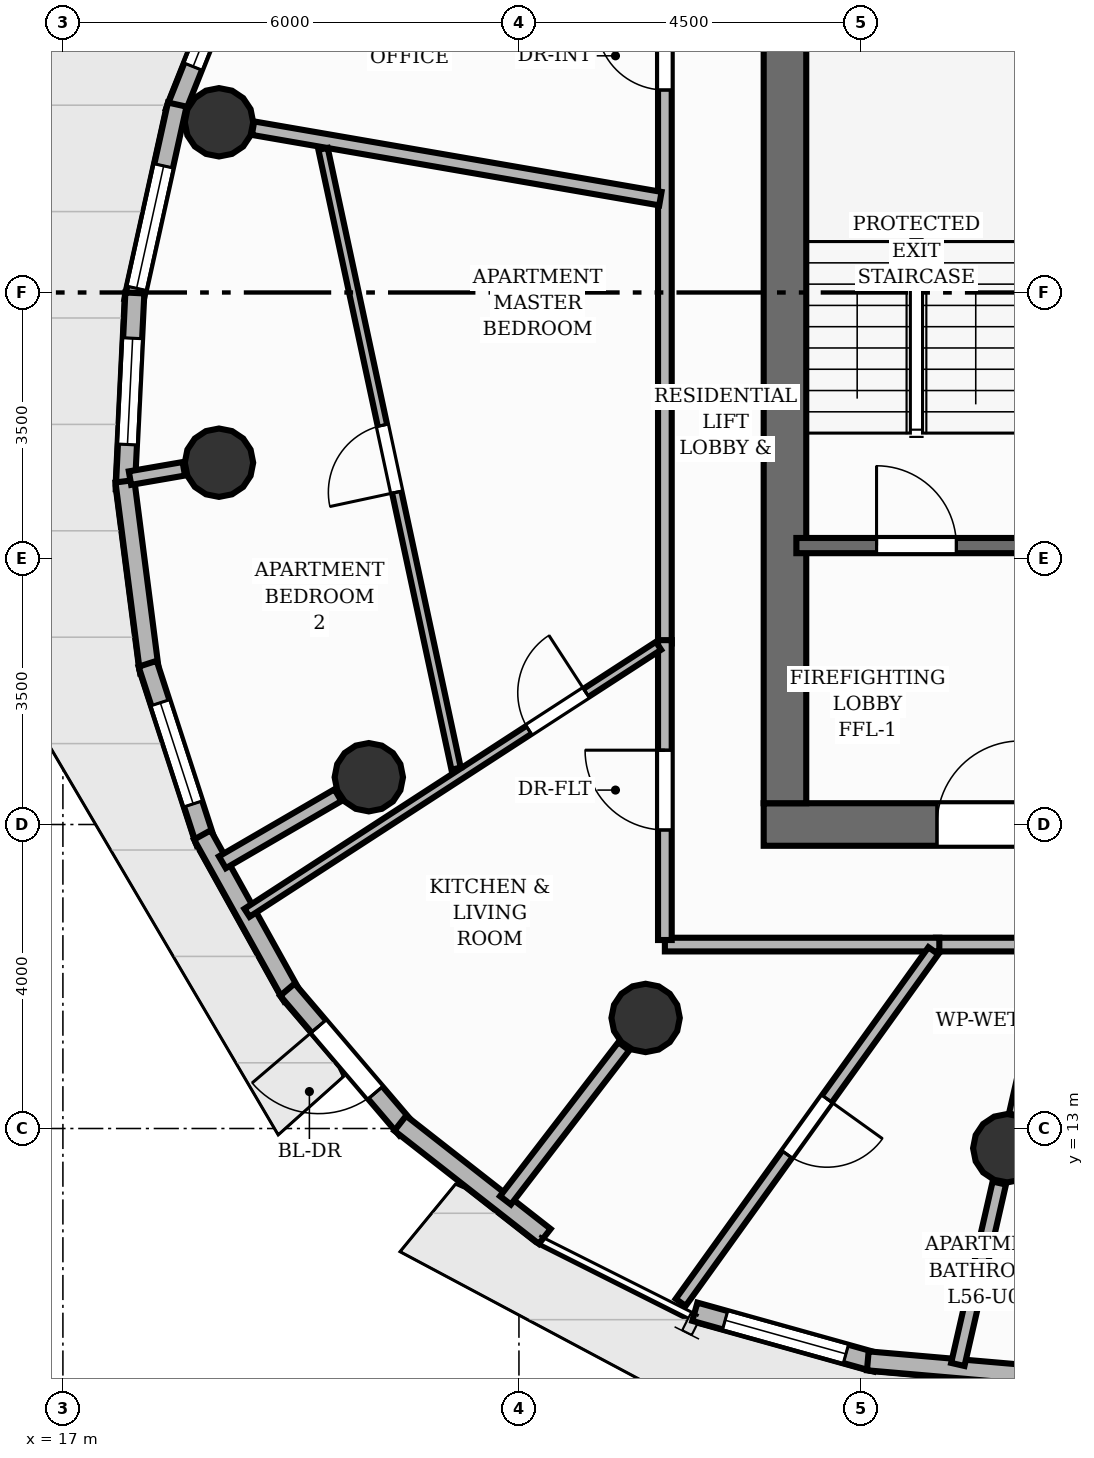
"""IFC4 building model, lengths in metres.
Left out: names, types, materials, properties, quantities, classifications, styles, units other than length and angle.
Written with IfcOpenShell. Run it as: python <this file> out.ifc"""

import sys

from ifc_helpers import new_model, si_unit, direction, frame, frame_2d, origin, origin_2d, place, context, subcontext, project, spatial, rectangle, circle, extrude, element, fill, save


model = new_model("IFC4")
c1 = context("Model", 3, precision=1e-05, world=origin(), true_north=direction((0.0, 1.0)))
c2 = subcontext(c1, "Body", "Model", "MODEL_VIEW")
j1 = project(units=[si_unit("LENGTHUNIT", "METRE"), si_unit("PLANEANGLEUNIT", "RADIAN")], contexts=[c1])
p1 = place(None, origin())
s1 = spatial("IfcSite", under=j1, at=p1, CompositionType="ELEMENT")
p2 = place(p1, origin())
s2 = spatial("IfcBuilding", under=s1, at=p2, CompositionType="ELEMENT")
p3 = place(p2, frame((0.0, 0.0, 188.64)))
s3 = spatial("IfcBuildingStorey", under=s2, at=p3, CompositionType="ELEMENT", Elevation=188.64)
p4 = place(p3, frame((26.22, 17.0, 0.0), z_axis=(0.0, 0.0, 1.0), x_axis=(1.0, 0.0, 0.0)))
e1 = element("IfcWall", 1, at=p4, inside=s3, PredefinedType="SHEAR", context=c2, shape_type="SweptSolid", body=[
    extrude(rectangle(XDim=11.56, YDim=0.56, at=frame_2d((5.78, 0.0))), origin(), (0.0, 0.0, 1.0), 3.2),
])
p5 = place(p4, frame((2.28, 0.0, 0.0)))
e2 = element("IfcOpeningElement", 2, at=p5, cuts=e1, PredefinedType="OPENING", context=c2, shape_type="SweptSolid", body=[
    extrude(rectangle(XDim=1.1, YDim=2.15, at=frame_2d((0.55, 1.075))), frame((0.0, 0.29, 0.0), z_axis=(0.0, -1.0, 0.0), x_axis=(1.0, 0.0, 0.0)), (0.0, 0.0, 1.0), 0.58),
])
p6 = place(p4, frame((5.83, 0.0, 0.0)))
e3 = element("IfcOpeningElement", 3, at=p6, cuts=e1, PredefinedType="OPENING", context=c2, shape_type="SweptSolid", body=[
    extrude(rectangle(XDim=0.9, YDim=2.1, at=frame_2d((0.45, 1.05))), frame((0.0, 0.29, 0.0), z_axis=(0.0, -1.0, 0.0), x_axis=(1.0, 0.0, 0.0)), (0.0, 0.0, 1.0), 0.58),
])
p7 = place(p3, frame((26.5, 17.28, 0.0), z_axis=(0.0, 0.0, 1.0), x_axis=(0.0, 1.0, 0.0)))
e4 = element("IfcWall", 4, at=p7, inside=s3, PredefinedType="SHEAR", context=c2, shape_type="SweptSolid", body=[
    extrude(rectangle(XDim=13.44, YDim=0.56, at=frame_2d((6.72, 0.0))), origin(), (0.0, 0.0, 1.0), 3.2),
])
for number, where, z_axis, x_axis in (
    (5, (19.054, 26.24, 0.0), (0.0, 0.0, 1.0), (1.0, 0.0, 0.0)),
    (6, (19.054, 21.76, 0.0), (0.0, 0.0, 1.0), (1.0, 0.0, 0.0)),
    (7, (21.025, 17.622, 0.0), (0.0, 0.0, 1.0), (1.0, 0.0, 0.0)),
    (8, (24.667, 14.455, 0.0), (0.0, 0.0, 1.0), (1.0, 0.0, 0.0)),
    (9, (29.425, 12.74, 0.0), (0.0, 0.0, 1.0), (1.0, 0.0, 0.0)),
):
    element("IfcColumn", number, at=place(p3, frame(where, z_axis=z_axis, x_axis=x_axis)), inside=s3, PredefinedType="COLUMN", context=c2, shape_type="SweptSolid", body=[
        extrude(circle(Radius=0.45, at=origin_2d()), origin(), (0.0, 0.0, 1.0), 3.2),
    ])
p8 = place(p3, frame((18.472, 26.367, 0.0), z_axis=(0.0, 0.0, 1.0), x_axis=(0.370330939431, 0.928899884433, 0.0)))
e10 = element("IfcWall", 10, at=p8, inside=s3, PredefinedType="SOLIDWALL", context=c2, shape_type="SweptSolid", body=[
    extrude(rectangle(XDim=2.702, YDim=0.25, at=frame_2d((1.351, 0.0))), origin(), (0.0, 0.0, 1.0), 2.96),
])
p9 = place(p8, frame((0.651, 0.0, 0.85)))
e11 = element("IfcOpeningElement", 11, at=p9, cuts=e10, PredefinedType="OPENING", context=c2, shape_type="SweptSolid", body=[
    extrude(rectangle(XDim=1.4, YDim=1.55, at=frame_2d((0.7, 0.775))), frame((0.0, 0.135, 0.0), z_axis=(0.0, -1.0, 0.0), x_axis=(1.0, 0.0, 0.0)), (0.0, 0.0, 1.0), 0.27),
])
p10 = place(p3, frame((17.932, 23.884, 0.0), z_axis=(0.0, 0.0, 1.0), x_axis=(0.215877166516, 0.976420528756, 0.0)))
e12 = element("IfcWall", 12, at=p10, inside=s3, PredefinedType="SOLIDWALL", context=c2, shape_type="SweptSolid", body=[
    extrude(rectangle(XDim=2.651, YDim=0.25, at=frame_2d((1.325, 0.0))), origin(), (0.0, 0.0, 1.0), 2.96),
])
p11 = place(p10, frame((0.175, 0.0, 0.85)))
e13 = element("IfcOpeningElement", 13, at=p11, cuts=e12, PredefinedType="OPENING", context=c2, shape_type="SweptSolid", body=[
    extrude(rectangle(XDim=1.65, YDim=1.55, at=frame_2d((0.825, 0.775))), frame((0.0, 0.135, 0.0), z_axis=(0.0, -1.0, 0.0), x_axis=(1.0, 0.0, 0.0)), (0.0, 0.0, 1.0), 0.27),
])
p12 = place(p3, frame((17.82, 21.405, 0.0), z_axis=(0.0, 0.0, 1.0), x_axis=(0.048688181414, 0.99881402723, 0.0)))
e14 = element("IfcWall", 14, at=p12, inside=s3, PredefinedType="SOLIDWALL", context=c2, shape_type="SweptSolid", body=[
    extrude(rectangle(XDim=2.593, YDim=0.25, at=frame_2d((1.296, 0.0))), origin(), (0.0, 0.0, 1.0), 2.96),
])
p13 = place(p12, frame((0.596, 0.0, 0.85)))
e15 = element("IfcOpeningElement", 15, at=p13, cuts=e14, PredefinedType="OPENING", context=c2, shape_type="SweptSolid", body=[
    extrude(rectangle(XDim=1.4, YDim=1.55, at=frame_2d((0.7, 0.775))), frame((0.0, 0.135, 0.0), z_axis=(0.0, -1.0, 0.0), x_axis=(1.0, 0.0, 0.0)), (0.0, 0.0, 1.0), 0.27),
])
p14 = place(p3, frame((18.14, 19.005, 0.0), z_axis=(0.0, 0.0, 1.0), x_axis=(-0.128057007482, 0.991766808698, 0.0)))
e16 = element("IfcWall", 16, at=p14, inside=s3, PredefinedType="SOLIDWALL", context=c2, shape_type="SweptSolid", body=[
    extrude(rectangle(XDim=2.532, YDim=0.25, at=frame_2d((1.266, 0.0))), origin(), (0.0, 0.0, 1.0), 2.96),
])
p15 = place(p3, frame((18.881, 16.759, 0.0), z_axis=(0.0, 0.0, 1.0), x_axis=(-0.309005861828, 0.951060133407, 0.0)))
e17 = element("IfcWall", 17, at=p15, inside=s3, PredefinedType="SOLIDWALL", context=c2, shape_type="SweptSolid", body=[
    extrude(rectangle(XDim=2.478, YDim=0.25, at=frame_2d((1.239, 0.0))), origin(), (0.0, 0.0, 1.0), 2.96),
])
p16 = place(p15, frame((0.539, 0.0, 0.85)))
e18 = element("IfcOpeningElement", 18, at=p16, cuts=e17, PredefinedType="OPENING", context=c2, shape_type="SweptSolid", body=[
    extrude(rectangle(XDim=1.4, YDim=1.55, at=frame_2d((0.7, 0.775))), frame((0.0, 0.135, 0.0), z_axis=(0.0, -1.0, 0.0), x_axis=(1.0, 0.0, 0.0)), (0.0, 0.0, 1.0), 0.27),
])
p17 = place(p3, frame((20.019, 14.733, 0.0), z_axis=(0.0, 0.0, 1.0), x_axis=(-0.485821561791, 0.874058013005, 0.0)))
e19 = element("IfcWall", 19, at=p17, inside=s3, PredefinedType="SOLIDWALL", context=c2, shape_type="SweptSolid", body=[
    extrude(rectangle(XDim=2.437, YDim=0.25, at=frame_2d((1.218, 0.0))), origin(), (0.0, 0.0, 1.0), 2.96),
])
p18 = place(p3, frame((21.521, 12.99, 0.0), z_axis=(0.0, 0.0, 1.0), x_axis=(-0.648874307696, 0.760895612297, 0.0)))
e20 = element("IfcWall", 20, at=p18, inside=s3, PredefinedType="SOLIDWALL", context=c2, shape_type="SweptSolid", body=[
    extrude(rectangle(XDim=2.415, YDim=0.25, at=frame_2d((1.208, 0.0))), origin(), (0.0, 0.0, 1.0), 2.96),
])
p19 = place(p18, frame((0.632, 0.0, 0.0)))
e21 = element("IfcOpeningElement", 21, at=p19, cuts=e20, PredefinedType="OPENING", context=c2, shape_type="SweptSolid", body=[
    extrude(rectangle(XDim=1.15, YDim=2.2, at=frame_2d((0.575, 1.1))), frame((0.0, 0.135, 0.0), z_axis=(0.0, -1.0, 0.0), x_axis=(1.0, 0.0, 0.0)), (0.0, 0.0, 1.0), 0.27),
])
p20 = place(p3, frame((23.339, 11.58, 0.0), z_axis=(0.0, 0.0, 1.0), x_axis=(-0.787404715416, 0.616436382883, 0.0)))
e22 = element("IfcWall", 22, at=p20, inside=s3, PredefinedType="SOLIDWALL", context=c2, shape_type="SweptSolid", body=[
    extrude(rectangle(XDim=2.415, YDim=0.25, at=frame_2d((1.208, 0.0))), origin(), (0.0, 0.0, 1.0), 2.96),
])
p21 = place(p3, frame((27.701, 9.923, 0.0), z_axis=(0.0, 0.0, 1.0), x_axis=(-0.96316841201, 0.26889888454, 0.0)))
e23 = element("IfcWall", 23, at=p21, inside=s3, PredefinedType="SOLIDWALL", context=c2, shape_type="SweptSolid", body=[
    extrude(rectangle(XDim=2.478, YDim=0.25, at=frame_2d((1.239, 0.0))), origin(), (0.0, 0.0, 1.0), 2.96),
])
p22 = place(p21, frame((0.414, 0.0, 0.85)))
e24 = element("IfcOpeningElement", 24, at=p22, cuts=e23, PredefinedType="OPENING", context=c2, shape_type="SweptSolid", body=[
    extrude(rectangle(XDim=1.65, YDim=1.55, at=frame_2d((0.825, 0.775))), frame((0.0, 0.135, 0.0), z_axis=(0.0, -1.0, 0.0), x_axis=(1.0, 0.0, 0.0)), (0.0, 0.0, 1.0), 0.27),
])
p23 = place(p3, frame((30.112, 9.724, 0.0), z_axis=(0.0, 0.0, 1.0), x_axis=(-0.996260822813, 0.08639660252, 0.0)))
e25 = element("IfcWall", 25, at=p23, inside=s3, PredefinedType="SOLIDWALL", context=c2, shape_type="SweptSolid", body=[
    extrude(rectangle(XDim=2.532, YDim=0.25, at=frame_2d((1.266, 0.0))), origin(), (0.0, 0.0, 1.0), 2.96),
])
p24 = place(p3, frame((26.65, 20.67, 0.0), z_axis=(0.0, 0.0, 1.0), x_axis=(1.0, 0.0, 0.0)))
e26 = element("IfcWall", 26, at=p24, inside=s3, PredefinedType="SHEAR", context=c2, shape_type="SweptSolid", body=[
    extrude(rectangle(XDim=3.24, YDim=0.2, at=frame_2d((1.62, 0.0))), origin(), (0.0, 0.0, 1.0), 3.2),
])
p25 = place(p24, frame((1.055, 0.0, 0.0)))
e27 = element("IfcOpeningElement", 27, at=p25, cuts=e26, PredefinedType="OPENING", context=c2, shape_type="SweptSolid", body=[
    extrude(rectangle(XDim=1.05, YDim=2.15, at=frame_2d((0.525, 1.075))), frame((0.0, 0.11, 0.0), z_axis=(0.0, -1.0, 0.0), x_axis=(1.0, 0.0, 0.0)), (0.0, 0.0, 1.0), 0.22),
])
p26 = place(p3, frame((18.591, 21.68, 0.0), z_axis=(0.0, 0.0, 1.0), x_axis=(-0.985336223431, -0.170623933826, 0.0)))
e28 = element("IfcWall", 28, at=p26, inside=s3, PredefinedType="PARTITIONING", context=c2, shape_type="SweptSolid", body=[
    extrude(rectangle(XDim=0.718, YDim=0.18, at=frame_2d((0.359, 0.0))), origin(), (0.0, 0.0, 1.0), 2.404),
])
p27 = place(p3, frame((20.618, 17.386, 0.0), z_axis=(0.0, 0.0, 1.0), x_axis=(-0.86461381872, -0.502437005482, 0.0)))
e29 = element("IfcWall", 29, at=p27, inside=s3, PredefinedType="PARTITIONING", context=c2, shape_type="SweptSolid", body=[
    extrude(rectangle(XDim=1.758, YDim=0.18, at=frame_2d((0.879, 0.0))), origin(), (0.0, 0.0, 1.0), 2.404),
])
p28 = place(p3, frame((24.38, 14.082, 0.0), z_axis=(0.0, 0.0, 1.0), x_axis=(-0.609249164273, -0.792978849549, 0.0)))
e30 = element("IfcWall", 30, at=p28, inside=s3, PredefinedType="PARTITIONING", context=c2, shape_type="SweptSolid", body=[
    extrude(rectangle(XDim=2.557, YDim=0.18, at=frame_2d((1.278, 0.0))), origin(), (0.0, 0.0, 1.0), 2.404),
])
p29 = place(p3, frame((29.32, 12.282, 0.0), z_axis=(0.0, 0.0, 1.0), x_axis=(-0.222943921747, -0.974831271429, 0.0)))
e31 = element("IfcWall", 31, at=p29, inside=s3, PredefinedType="PARTITIONING", context=c2, shape_type="SweptSolid", body=[
    extrude(rectangle(XDim=2.448, YDim=0.18, at=frame_2d((1.224, 0.0))), origin(), (0.0, 0.0, 1.0), 2.404),
])
p30 = place(p3, frame((39.08, 15.42, 0.0), z_axis=(0.0, 0.0, 1.0), x_axis=(-1.0, 0.0, 0.0)))
e32 = element("IfcWall", 32, at=p30, inside=s3, PredefinedType="PARTITIONING", context=c2, shape_type="SweptSolid", body=[
    extrude(rectangle(XDim=10.594, YDim=0.18, at=frame_2d((5.297, 0.0))), origin(), (0.0, 0.0, 1.0), 2.955),
])
p31 = place(p30, frame((3.021, 0.0, 0.0)))
e33 = element("IfcOpeningElement", 33, at=p31, cuts=e32, PredefinedType="OPENING", context=c2, shape_type="SweptSolid", body=[
    extrude(rectangle(XDim=0.9, YDim=2.1, at=frame_2d((0.45, 1.05))), frame((0.0, 0.1, 0.0), z_axis=(0.0, -1.0, 0.0), x_axis=(1.0, 0.0, 0.0)), (0.0, 0.0, 1.0), 0.2),
])
p32 = place(p30, frame((6.508, 0.0, 0.0)))
e34 = element("IfcOpeningElement", 34, at=p32, cuts=e32, PredefinedType="OPENING", context=c2, shape_type="SweptSolid", body=[
    extrude(rectangle(XDim=0.9, YDim=2.1, at=frame_2d((0.45, 1.05))), frame((0.0, 0.1, 0.0), z_axis=(0.0, -1.0, 0.0), x_axis=(1.0, 0.0, 0.0)), (0.0, 0.0, 1.0), 0.2),
])
p33 = place(p3, frame((24.92, 19.382, 0.0), z_axis=(0.0, 0.0, 1.0), x_axis=(0.0, 1.0, 0.0)))
e35 = element("IfcWall", 35, at=p33, inside=s3, PredefinedType="PARTITIONING", context=c2, shape_type="SweptSolid", body=[
    extrude(rectangle(XDim=13.198, YDim=0.18, at=frame_2d((6.599, 0.0))), origin(), (0.0, 0.0, 1.0), 2.955),
])
p34 = place(p33, frame((7.282, 0.0, 0.0)))
e36 = element("IfcOpeningElement", 36, at=p34, cuts=e35, PredefinedType="OPENING", context=c2, shape_type="SweptSolid", body=[
    extrude(rectangle(XDim=0.9, YDim=2.1, at=frame_2d((0.45, 1.05))), frame((0.0, 0.1, 0.0), z_axis=(0.0, -1.0, 0.0), x_axis=(1.0, 0.0, 0.0)), (0.0, 0.0, 1.0), 0.2),
])
p35 = place(p3, frame((28.531, 15.42, 0.0), z_axis=(0.0, 0.0, 1.0), x_axis=(-1.0, 0.0, 0.0)))
e37 = element("IfcWall", 37, at=p35, inside=s3, PredefinedType="PARTITIONING", context=c2, shape_type="SweptSolid", body=[
    extrude(rectangle(XDim=3.611, YDim=0.18, at=frame_2d((1.805, 0.0))), origin(), (0.0, 0.0, 1.0), 2.955),
])
p36 = place(p3, frame((24.92, 15.48, 0.0), z_axis=(0.0, 0.0, 1.0), x_axis=(0.0, 1.0, 0.0)))
e38 = element("IfcWall", 38, at=p36, inside=s3, PredefinedType="PARTITIONING", context=c2, shape_type="SweptSolid", body=[
    extrude(rectangle(XDim=3.946, YDim=0.18, at=frame_2d((1.973, 0.0))), origin(), (0.0, 0.0, 1.0), 2.955),
])
p37 = place(p36, frame((1.448, 0.0, 0.0)))
e39 = element("IfcOpeningElement", 39, at=p37, cuts=e38, PredefinedType="OPENING", context=c2, shape_type="SweptSolid", body=[
    extrude(rectangle(XDim=1.05, YDim=2.15, at=frame_2d((0.525, 1.075))), frame((0.0, 0.1, 0.0), z_axis=(0.0, -1.0, 0.0), x_axis=(1.0, 0.0, 0.0)), (0.0, 0.0, 1.0), 0.2),
])
p38 = place(p3, frame((29.525, 13.179, 0.0), z_axis=(0.0, 0.0, 1.0), x_axis=(0.222969522248, 0.974825416241, 0.0)))
e40 = element("IfcWall", 40, at=p38, inside=s3, PredefinedType="PLUMBINGWALL", context=c2, shape_type="SweptSolid", body=[
    extrude(rectangle(XDim=2.199, YDim=0.16, at=frame_2d((1.099, 0.0))), origin(), (0.0, 0.0, 1.0), 2.404),
])
p39 = place(p3, frame((24.861, 25.235, 0.0), z_axis=(0.0, 0.0, 1.0), x_axis=(-0.985368487575, 0.170437506711, 0.0)))
e41 = element("IfcWall", 41, at=p39, inside=s3, PredefinedType="PARTITIONING", context=c2, shape_type="SweptSolid", body=[
    extrude(rectangle(XDim=5.439, YDim=0.18, at=frame_2d((2.719, 0.0))), origin(), (0.0, 0.0, 1.0), 2.404),
])
p40 = place(p3, frame((28.452, 15.339, 0.0), z_axis=(0.0, 0.0, 1.0), x_axis=(-0.583489481732, -0.812120695899, 0.0)))
e42 = element("IfcWall", 42, at=p40, inside=s3, PredefinedType="PLUMBINGWALL", context=c2, shape_type="SweptSolid", body=[
    extrude(rectangle(XDim=5.698, YDim=0.16, at=frame_2d((2.849, 0.0))), origin(), (0.0, 0.0, 1.0), 2.692),
])
p41 = place(p40, frame((2.399, 0.0, 0.0)))
e43 = element("IfcOpeningElement", 43, at=p41, cuts=e42, PredefinedType="OPENING", context=c2, shape_type="SweptSolid", body=[
    extrude(rectangle(XDim=0.9, YDim=2.1, at=frame_2d((0.45, 1.05))), frame((0.0, 0.09, 0.0), z_axis=(0.0, -1.0, 0.0), x_axis=(1.0, 0.0, 0.0)), (0.0, 0.0, 1.0), 0.18),
])
p42 = place(p3, frame((19.422, 15.838, 0.0), z_axis=(0.0, 0.0, 1.0), x_axis=(0.838876327826, 0.544322061479, 0.0)))
e44 = element("IfcWall", 44, at=p42, inside=s3, PredefinedType="PARTITIONING", context=c2, shape_type="SweptSolid", body=[
    extrude(rectangle(XDim=6.454, YDim=0.125, at=frame_2d((3.227, 0.0))), origin(), (0.0, 0.0, 1.0), 2.955),
])
p43 = place(p42, frame((4.419, 0.0, 0.0)))
e45 = element("IfcOpeningElement", 45, at=p43, cuts=e44, PredefinedType="OPENING", context=c2, shape_type="SweptSolid", body=[
    extrude(rectangle(XDim=0.9, YDim=2.1, at=frame_2d((0.45, 1.05))), frame((0.0, 0.073, 0.0), z_axis=(0.0, -1.0, 0.0), x_axis=(1.0, 0.0, 0.0)), (0.0, 0.0, 1.0), 0.145),
])
p44 = place(p3, frame((22.173, 17.735, 0.0), z_axis=(0.0, 0.0, 1.0), x_axis=(-0.20987090056, 0.977729106194, 0.0)))
e46 = element("IfcWall", 46, at=p44, inside=s3, PredefinedType="PARTITIONING", context=c2, shape_type="SweptSolid", body=[
    extrude(rectangle(XDim=8.341, YDim=0.125, at=frame_2d((4.17, 0.0))), origin(), (0.0, 0.0, 1.0), 2.955),
])
p45 = place(p44, frame((3.72, 0.0, 0.0)))
e47 = element("IfcOpeningElement", 47, at=p45, cuts=e46, PredefinedType="OPENING", context=c2, shape_type="SweptSolid", body=[
    extrude(rectangle(XDim=0.9, YDim=2.1, at=frame_2d((0.45, 1.05))), frame((0.0, 0.073, 0.0), z_axis=(0.0, -1.0, 0.0), x_axis=(1.0, 0.0, 0.0)), (0.0, 0.0, 1.0), 0.145),
])
p46 = place(p19, origin())
e48 = element("IfcDoor", 48, at=p46, inside=s3, OperationType="SINGLE_SWING_RIGHT", PredefinedType="DOOR", context=c2, shape_type="SweptSolid", body=[
    extrude(rectangle(XDim=1.15, YDim=2.2, at=frame_2d((0.575, 1.1))), frame((0.0, 0.025, 0.0), z_axis=(0.0, -1.0, 0.0), x_axis=(1.0, 0.0, 0.0)), (0.0, 0.0, 1.0), 0.05),
])
fill(e21, e48)
p47 = place(p9, origin())
e49 = element("IfcWindow", 49, at=p47, inside=s3, PartitioningType="SINGLE_PANEL", PredefinedType="WINDOW", context=c2, shape_type="SweptSolid", body=[
    extrude(rectangle(XDim=1.4, YDim=1.55, at=frame_2d((0.7, 0.775))), frame((0.0, 0.03, 0.0), z_axis=(0.0, -1.0, 0.0), x_axis=(1.0, 0.0, 0.0)), (0.0, 0.0, 1.0), 0.06),
])
fill(e11, e49)
p48 = place(p11, origin())
e50 = element("IfcWindow", 50, at=p48, inside=s3, PartitioningType="SINGLE_PANEL", PredefinedType="WINDOW", context=c2, shape_type="SweptSolid", body=[
    extrude(rectangle(XDim=1.65, YDim=1.55, at=frame_2d((0.825, 0.775))), frame((0.0, 0.03, 0.0), z_axis=(0.0, -1.0, 0.0), x_axis=(1.0, 0.0, 0.0)), (0.0, 0.0, 1.0), 0.06),
])
fill(e13, e50)
p49 = place(p13, origin())
e51 = element("IfcWindow", 51, at=p49, inside=s3, PartitioningType="SINGLE_PANEL", PredefinedType="WINDOW", context=c2, shape_type="SweptSolid", body=[
    extrude(rectangle(XDim=1.4, YDim=1.55, at=frame_2d((0.7, 0.775))), frame((0.0, 0.03, 0.0), z_axis=(0.0, -1.0, 0.0), x_axis=(1.0, 0.0, 0.0)), (0.0, 0.0, 1.0), 0.06),
])
fill(e15, e51)
p50 = place(p16, origin())
e52 = element("IfcWindow", 52, at=p50, inside=s3, PartitioningType="SINGLE_PANEL", PredefinedType="WINDOW", context=c2, shape_type="SweptSolid", body=[
    extrude(rectangle(XDim=1.4, YDim=1.55, at=frame_2d((0.7, 0.775))), frame((0.0, 0.03, 0.0), z_axis=(0.0, -1.0, 0.0), x_axis=(1.0, 0.0, 0.0)), (0.0, 0.0, 1.0), 0.06),
])
fill(e18, e52)
p51 = place(p22, origin())
e53 = element("IfcWindow", 53, at=p51, inside=s3, PartitioningType="SINGLE_PANEL", PredefinedType="WINDOW", context=c2, shape_type="SweptSolid", body=[
    extrude(rectangle(XDim=1.65, YDim=1.55, at=frame_2d((0.825, 0.775))), frame((0.0, 0.03, 0.0), z_axis=(0.0, -1.0, 0.0), x_axis=(1.0, 0.0, 0.0)), (0.0, 0.0, 1.0), 0.06),
])
fill(e24, e53)
p52 = place(p25, origin())
e54 = element("IfcDoor", 54, at=p52, inside=s3, OperationType="SINGLE_SWING_LEFT", PredefinedType="DOOR", context=c2, shape_type="SweptSolid", body=[
    extrude(rectangle(XDim=1.05, YDim=2.15, at=frame_2d((0.525, 1.075))), frame((0.0, 0.025, 0.0), z_axis=(0.0, -1.0, 0.0), x_axis=(1.0, 0.0, 0.0)), (0.0, 0.0, 1.0), 0.05),
])
fill(e27, e54)
p53 = place(p5, origin())
e55 = element("IfcDoor", 55, at=p53, inside=s3, OperationType="SINGLE_SWING_RIGHT", PredefinedType="DOOR", context=c2, shape_type="SweptSolid", body=[
    extrude(rectangle(XDim=1.1, YDim=2.15, at=frame_2d((0.55, 1.075))), frame((0.0, 0.025, 0.0), z_axis=(0.0, -1.0, 0.0), x_axis=(1.0, 0.0, 0.0)), (0.0, 0.0, 1.0), 0.05),
])
fill(e2, e55)
p54 = place(p34, origin())
e56 = element("IfcDoor", 56, at=p54, inside=s3, OperationType="SINGLE_SWING_RIGHT", PredefinedType="DOOR", context=c2, shape_type="SweptSolid", body=[
    extrude(rectangle(XDim=0.9, YDim=2.1, at=frame_2d((0.45, 1.05))), frame((0.0, 0.025, 0.0), z_axis=(0.0, -1.0, 0.0), x_axis=(1.0, 0.0, 0.0)), (0.0, 0.0, 1.0), 0.05),
])
fill(e36, e56)
p55 = place(p37, origin())
e57 = element("IfcDoor", 57, at=p55, inside=s3, OperationType="SINGLE_SWING_RIGHT", PredefinedType="DOOR", context=c2, shape_type="SweptSolid", body=[
    extrude(rectangle(XDim=1.05, YDim=2.15, at=frame_2d((0.525, 1.075))), frame((0.0, 0.025, 0.0), z_axis=(0.0, -1.0, 0.0), x_axis=(1.0, 0.0, 0.0)), (0.0, 0.0, 1.0), 0.05),
])
fill(e39, e57)
p56 = place(p41, origin())
e58 = element("IfcDoor", 58, at=p56, inside=s3, OperationType="SINGLE_SWING_LEFT", PredefinedType="DOOR", context=c2, shape_type="SweptSolid", body=[
    extrude(rectangle(XDim=0.9, YDim=2.1, at=frame_2d((0.45, 1.05))), frame((0.0, 0.025, 0.0), z_axis=(0.0, -1.0, 0.0), x_axis=(1.0, 0.0, 0.0)), (0.0, 0.0, 1.0), 0.05),
])
fill(e43, e58)
p57 = place(p43, origin())
e59 = element("IfcDoor", 59, at=p57, inside=s3, OperationType="SINGLE_SWING_RIGHT", PredefinedType="DOOR", context=c2, shape_type="SweptSolid", body=[
    extrude(rectangle(XDim=0.9, YDim=2.1, at=frame_2d((0.45, 1.05))), frame((0.0, 0.025, 0.0), z_axis=(0.0, -1.0, 0.0), x_axis=(1.0, 0.0, 0.0)), (0.0, 0.0, 1.0), 0.05),
])
fill(e45, e59)
p58 = place(p45, origin())
e60 = element("IfcDoor", 60, at=p58, inside=s3, OperationType="SINGLE_SWING_LEFT", PredefinedType="DOOR", context=c2, shape_type="SweptSolid", body=[
    extrude(rectangle(XDim=0.9, YDim=2.1, at=frame_2d((0.45, 1.05))), frame((0.0, 0.025, 0.0), z_axis=(0.0, -1.0, 0.0), x_axis=(1.0, 0.0, 0.0)), (0.0, 0.0, 1.0), 0.05),
])
fill(e47, e60)
save(model, sys.argv[1])
